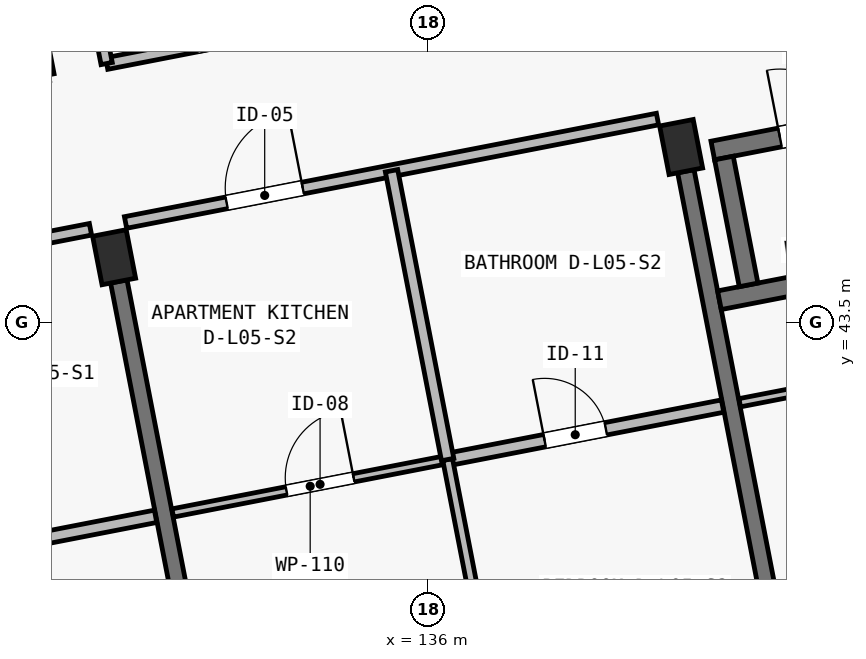
"""IFC4 building model, lengths in metres.
Left out: names, types, materials, properties, quantities, classifications, styles, units other than length and angle.
Written with IfcOpenShell. Run it as: python <this file> out.ifc"""

import sys

from ifc_helpers import new_model, si_unit, direction, frame, frame_2d, origin, origin_2d, place, context, subcontext, project, spatial, rectangle, extrude, element, fill, save


model = new_model("IFC4")
c1 = context("Model", 3, precision=1e-05, world=origin(), true_north=direction((0.0, 1.0)))
c2 = subcontext(c1, "Body", "Model", "MODEL_VIEW")
j1 = project(units=[si_unit("LENGTHUNIT", "METRE"), si_unit("PLANEANGLEUNIT", "RADIAN")], contexts=[c1])
p1 = place(None, origin())
s1 = spatial("IfcSite", under=j1, at=p1, CompositionType="ELEMENT")
p2 = place(p1, origin())
s2 = spatial("IfcBuilding", under=s1, at=p2, CompositionType="ELEMENT")
p3 = place(p2, frame((0.0, 0.0, 18.15)))
s3 = spatial("IfcBuildingStorey", under=s2, at=p3, CompositionType="ELEMENT", Elevation=18.15)
for number, where, z_axis, x_axis in (
    (1, (131.871, 44.361, 0.0), (0.0, 0.0, 1.0), (0.982, 0.191, 0.0)),
    (2, (139.331, 45.811, 0.0), (0.0, 0.0, 1.0), (0.982, 0.191, 0.0)),
):
    element("IfcColumn", number, at=place(p3, frame(where, z_axis=z_axis, x_axis=x_axis)), inside=s3, PredefinedType="COLUMN", context=c2, shape_type="SweptSolid", body=[
        extrude(rectangle(XDim=0.45, YDim=0.65, at=origin_2d()), origin(), (0.0, 0.0, 1.0), 3.25),
    ])
p4 = place(p3, frame((133.259, 37.219, 0.0), z_axis=(0.0, 0.0, 1.0), x_axis=(-0.19081042584, 0.981626905393, 0.0)))
e3 = element("IfcWall", 3, at=p4, inside=s3, PredefinedType="SHEAR", context=c2, shape_type="SweptSolid", body=[
    extrude(rectangle(XDim=6.95, YDim=0.22, at=frame_2d((3.475, 0.0))), origin(), (0.0, 0.0, 1.0), 2.5),
])
p5 = place(p3, frame((140.719, 38.669, 0.0), z_axis=(0.0, 0.0, 1.0), x_axis=(-0.190783155939, 0.981632205773, 0.0)))
e4 = element("IfcWall", 4, at=p5, inside=s3, PredefinedType="SHEAR", context=c2, shape_type="SweptSolid", body=[
    extrude(rectangle(XDim=6.95, YDim=0.22, at=frame_2d((3.475, 0.0))), origin(), (0.0, 0.0, 1.0), 2.5),
])
p6 = place(p3, frame((139.835, 43.795, 0.0), z_axis=(0.0, 0.0, 1.0), x_axis=(0.981624737535, 0.190821578075, 0.0)))
e5 = element("IfcWall", 5, at=p6, inside=s3, PredefinedType="SHEAR", context=c2, shape_type="SweptSolid", body=[
    extrude(rectangle(XDim=2.99, YDim=0.25, at=frame_2d((1.495, 0.0))), origin(), (0.0, 0.0, 1.0), 3.25),
])
p7 = place(p3, frame((139.748, 45.764, 0.0), z_axis=(0.0, 0.0, 1.0), x_axis=(0.981630445883, 0.190792210834, 0.0)))
e6 = element("IfcWall", 6, at=p7, inside=s3, PredefinedType="SHEAR", context=c2, shape_type="SweptSolid", body=[
    extrude(rectangle(XDim=2.7, YDim=0.25, at=frame_2d((1.35, 0.0))), origin(), (0.0, 0.0, 1.0), 3.25),
])
p8 = place(p7, frame((0.9, 0.0, 0.0)))
e7 = element("IfcOpeningElement", 7, at=p8, cuts=e6, PredefinedType="OPENING", context=c2, shape_type="SweptSolid", body=[
    extrude(rectangle(XDim=0.9, YDim=2.05, at=frame_2d((0.45, 1.025))), frame((0.0, 0.14, 0.0), z_axis=(0.0, -1.0, 0.0), x_axis=(1.0, 0.0, 0.0)), (0.0, 0.0, 1.0), 0.28),
])
p9 = place(p3, frame((140.218, 43.997, 0.0), z_axis=(0.0, 0.0, 1.0), x_axis=(-0.190727425199, 0.981643035567, 0.0)))
e8 = element("IfcWall", 8, at=p9, inside=s3, PredefinedType="SHEAR", context=c2, shape_type="SweptSolid", body=[
    extrude(rectangle(XDim=1.7, YDim=0.25, at=frame_2d((0.85, 0.0))), origin(), (0.0, 0.0, 1.0), 3.25),
])
p10 = place(p3, frame((124.561, 43.368, 0.0), z_axis=(0.0, 0.0, 1.0), x_axis=(0.981630356092, 0.190792672811, 0.0)))
e9 = element("IfcWall", 9, at=p10, inside=s3, PredefinedType="PARTITIONING", context=c2, shape_type="SweptSolid", body=[
    extrude(rectangle(XDim=7.13, YDim=0.155, at=frame_2d((3.565, 0.0))), origin(), (0.0, 0.0, 1.0), 2.97),
])
p11 = place(p10, frame((1.355, 0.0, 0.0)))
e10 = element("IfcOpeningElement", 10, at=p11, cuts=e9, PredefinedType="OPENING", context=c2, shape_type="SweptSolid", body=[
    extrude(rectangle(XDim=0.98, YDim=2.15, at=frame_2d((0.49, 1.075))), frame((0.0, 0.093, 0.0), z_axis=(0.0, -1.0, 0.0), x_axis=(1.0, 0.0, 0.0)), (0.0, 0.0, 1.0), 0.185),
])
p12 = place(p3, frame((128.799, 40.249, 0.0), z_axis=(0.0, 0.0, 1.0), x_axis=(0.981628834294, 0.190800502313, 0.0)))
e11 = element("IfcWall", 11, at=p12, inside=s3, PredefinedType="PLUMBINGWALL", context=c2, shape_type="SweptSolid", body=[
    extrude(rectangle(XDim=3.685, YDim=0.165, at=frame_2d((1.843, 0.0))), origin(), (0.0, 0.0, 1.0), 2.97),
])
p13 = place(p12, frame((1.3, 0.0, 0.0)))
e12 = element("IfcOpeningElement", 12, at=p13, cuts=e11, PredefinedType="OPENING", context=c2, shape_type="SweptSolid", body=[
    extrude(rectangle(XDim=0.82, YDim=2.08, at=frame_2d((0.41, 1.04))), frame((0.0, 0.097, 0.0), z_axis=(0.0, -1.0, 0.0), x_axis=(1.0, 0.0, 0.0)), (0.0, 0.0, 1.0), 0.195),
])
p14 = place(p3, frame((132.021, 44.818, 0.0), z_axis=(0.0, 0.0, 1.0), x_axis=(0.981629109582, 0.190799086008, 0.0)))
e13 = element("IfcWall", 13, at=p14, inside=s3, PredefinedType="PARTITIONING", context=c2, shape_type="SweptSolid", body=[
    extrude(rectangle(XDim=7.13, YDim=0.155, at=frame_2d((3.565, 0.0))), origin(), (0.0, 0.0, 1.0), 2.97),
])
p15 = place(p14, frame((1.355, 0.0, 0.0)))
e14 = element("IfcOpeningElement", 14, at=p15, cuts=e13, PredefinedType="OPENING", context=c2, shape_type="SweptSolid", body=[
    extrude(rectangle(XDim=1.02, YDim=2.2, at=frame_2d((0.51, 1.1))), frame((0.0, 0.093, 0.0), z_axis=(0.0, -1.0, 0.0), x_axis=(1.0, 0.0, 0.0)), (0.0, 0.0, 1.0), 0.185),
])
p16 = place(p3, frame((132.642, 40.996, 0.0), z_axis=(0.0, 0.0, 1.0), x_axis=(0.981626422232, 0.190812911449, 0.0)))
e15 = element("IfcWall", 15, at=p16, inside=s3, PredefinedType="PARTITIONING", context=c2, shape_type="SweptSolid", body=[
    extrude(rectangle(XDim=3.685, YDim=0.11, at=frame_2d((1.842, 0.0))), origin(), (0.0, 0.0, 1.0), 2.97),
])
p17 = place(p16, frame((1.525, 0.0, 0.0)))
e16 = element("IfcOpeningElement", 16, at=p17, cuts=e15, PredefinedType="OPENING", context=c2, shape_type="SweptSolid", body=[
    extrude(rectangle(XDim=0.9, YDim=2.1, at=frame_2d((0.45, 1.05))), frame((0.0, 0.07, 0.0), z_axis=(0.0, -1.0, 0.0), x_axis=(1.0, 0.0, 0.0)), (0.0, 0.0, 1.0), 0.14),
])
p18 = place(p3, frame((136.259, 41.699, 0.0), z_axis=(0.0, 0.0, 1.0), x_axis=(0.981628834294, 0.190800502313, 0.0)))
e17 = element("IfcWall", 17, at=p18, inside=s3, PredefinedType="PLUMBINGWALL", context=c2, shape_type="SweptSolid", body=[
    extrude(rectangle(XDim=3.685, YDim=0.165, at=frame_2d((1.843, 0.0))), origin(), (0.0, 0.0, 1.0), 2.97),
])
p19 = place(p18, frame((1.3, 0.0, 0.0)))
e18 = element("IfcOpeningElement", 18, at=p19, cuts=e17, PredefinedType="OPENING", context=c2, shape_type="SweptSolid", body=[
    extrude(rectangle(XDim=0.82, YDim=2.08, at=frame_2d((0.41, 1.04))), frame((0.0, 0.097, 0.0), z_axis=(0.0, -1.0, 0.0), x_axis=(1.0, 0.0, 0.0)), (0.0, 0.0, 1.0), 0.195),
])
p20 = place(p3, frame((137.125, 37.242, 0.0), z_axis=(0.0, 0.0, 1.0), x_axis=(-0.190787619192, 0.981631338316, 0.0)))
e19 = element("IfcWall", 19, at=p20, inside=s3, PredefinedType="PARTITIONING", context=c2, shape_type="SweptSolid", body=[
    extrude(rectangle(XDim=4.54, YDim=0.13, at=frame_2d((2.27, 0.0))), origin(), (0.0, 0.0, 1.0), 2.97),
])
p21 = place(p20, frame((1.35, 0.0, 0.0)))
e20 = element("IfcOpeningElement", 20, at=p21, cuts=e19, PredefinedType="OPENING", context=c2, shape_type="SweptSolid", body=[
    extrude(rectangle(XDim=0.88, YDim=2.1, at=frame_2d((0.44, 1.05))), frame((0.0, 0.08, 0.0), z_axis=(0.0, -1.0, 0.0), x_axis=(1.0, 0.0, 0.0)), (0.0, 0.0, 1.0), 0.16),
])
p22 = place(p3, frame((136.259, 41.699, 0.0), z_axis=(0.0, 0.0, 1.0), x_axis=(-0.190835887914, 0.981621955686, 0.0)))
e21 = element("IfcWall", 21, at=p22, inside=s3, PredefinedType="PLUMBINGWALL", context=c2, shape_type="SweptSolid", body=[
    extrude(rectangle(XDim=3.87, YDim=0.165, at=frame_2d((1.935, 0.0))), origin(), (0.0, 0.0, 1.0), 2.97),
])
p23 = place(p3, frame((140.102, 42.446, 0.0), z_axis=(0.0, 0.0, 1.0), x_axis=(0.981621892043, 0.19083621528, 0.0)))
e22 = element("IfcWall", 22, at=p23, inside=s3, PredefinedType="PARTITIONING", context=c2, shape_type="SweptSolid", body=[
    extrude(rectangle(XDim=5.08, YDim=0.11, at=frame_2d((2.54, 0.0))), origin(), (0.0, 0.0, 1.0), 2.97),
])
p24 = place(p23, frame((3.595, 0.0, 0.0)))
e23 = element("IfcOpeningElement", 23, at=p24, cuts=e22, PredefinedType="OPENING", context=c2, shape_type="SweptSolid", body=[
    extrude(rectangle(XDim=0.9, YDim=2.1, at=frame_2d((0.45, 1.05))), frame((0.0, 0.07, 0.0), z_axis=(0.0, -1.0, 0.0), x_axis=(1.0, 0.0, 0.0)), (0.0, 0.0, 1.0), 0.14),
])
p25 = place(p3, frame((131.007, 46.76, 0.0), z_axis=(0.0, 0.0, 1.0), x_axis=(-0.190809410863, 0.981627102685, 0.0)))
e24 = element("IfcWall", 24, at=p25, inside=s3, PredefinedType="PARTITIONING", context=c2, shape_type="SweptSolid", body=[
    extrude(rectangle(XDim=9.87, YDim=0.15, at=frame_2d((4.935, 0.0))), origin(), (0.0, 0.0, 1.0), 2.97),
])
p26 = place(p3, frame((131.772, 46.909, 0.0), z_axis=(0.0, 0.0, 1.0), x_axis=(0.981622468528, 0.190833249935, 0.0)))
e25 = element("IfcWall", 25, at=p26, inside=s3, PredefinedType="PARTITIONING", context=c2, shape_type="SweptSolid", body=[
    extrude(rectangle(XDim=6.82, YDim=0.155, at=frame_2d((3.41, 0.0))), origin(), (0.0, 0.0, 1.0), 2.97),
])
p27 = place(p26, frame((1.205, 0.0, 0.0)))
e26 = element("IfcOpeningElement", 26, at=p27, cuts=e25, PredefinedType="OPENING", context=c2, shape_type="SweptSolid", body=[
    extrude(rectangle(XDim=1.02, YDim=2.2, at=frame_2d((0.51, 1.1))), frame((0.0, 0.093, 0.0), z_axis=(0.0, -1.0, 0.0), x_axis=(1.0, 0.0, 0.0)), (0.0, 0.0, 1.0), 0.185),
])
p28 = place(p3, frame((131.772, 46.909, 0.0), z_axis=(0.0, 0.0, 1.0), x_axis=(-0.1907855758, 0.981631735462, 0.0)))
e27 = element("IfcWall", 27, at=p28, inside=s3, PredefinedType="PARTITIONING", context=c2, shape_type="SweptSolid", body=[
    extrude(rectangle(XDim=9.87, YDim=0.15, at=frame_2d((4.935, 0.0))), origin(), (0.0, 0.0, 1.0), 2.97),
])
p29 = place(p15, origin())
e28 = element("IfcDoor", 28, at=p29, inside=s3, OperationType="SINGLE_SWING_RIGHT", PredefinedType="DOOR", context=c2, shape_type="SweptSolid", body=[
    extrude(rectangle(XDim=1.02, YDim=2.2, at=frame_2d((0.51, 1.1))), frame((0.0, 0.025, 0.0), z_axis=(0.0, -1.0, 0.0), x_axis=(1.0, 0.0, 0.0)), (0.0, 0.0, 1.0), 0.05),
])
fill(e14, e28)
p30 = place(p17, origin())
e29 = element("IfcDoor", 29, at=p30, inside=s3, OperationType="SINGLE_SWING_RIGHT", PredefinedType="DOOR", context=c2, shape_type="SweptSolid", body=[
    extrude(rectangle(XDim=0.9, YDim=2.1, at=frame_2d((0.45, 1.05))), frame((0.0, 0.025, 0.0), z_axis=(0.0, -1.0, 0.0), x_axis=(1.0, 0.0, 0.0)), (0.0, 0.0, 1.0), 0.05),
])
fill(e16, e29)
p31 = place(p19, origin())
e30 = element("IfcDoor", 30, at=p31, inside=s3, OperationType="SINGLE_SWING_LEFT", PredefinedType="DOOR", context=c2, shape_type="SweptSolid", body=[
    extrude(rectangle(XDim=0.82, YDim=2.08, at=frame_2d((0.41, 1.04))), frame((0.0, 0.025, 0.0), z_axis=(0.0, -1.0, 0.0), x_axis=(1.0, 0.0, 0.0)), (0.0, 0.0, 1.0), 0.05),
])
fill(e18, e30)
p32 = place(p8, origin())
e31 = element("IfcDoor", 31, at=p32, inside=s3, OperationType="SINGLE_SWING_LEFT", PredefinedType="DOOR", context=c2, shape_type="SweptSolid", body=[
    extrude(rectangle(XDim=0.9, YDim=2.05, at=frame_2d((0.45, 1.025))), frame((0.0, 0.025, 0.0), z_axis=(0.0, -1.0, 0.0), x_axis=(1.0, 0.0, 0.0)), (0.0, 0.0, 1.0), 0.05),
])
fill(e7, e31)
save(model, sys.argv[1])
